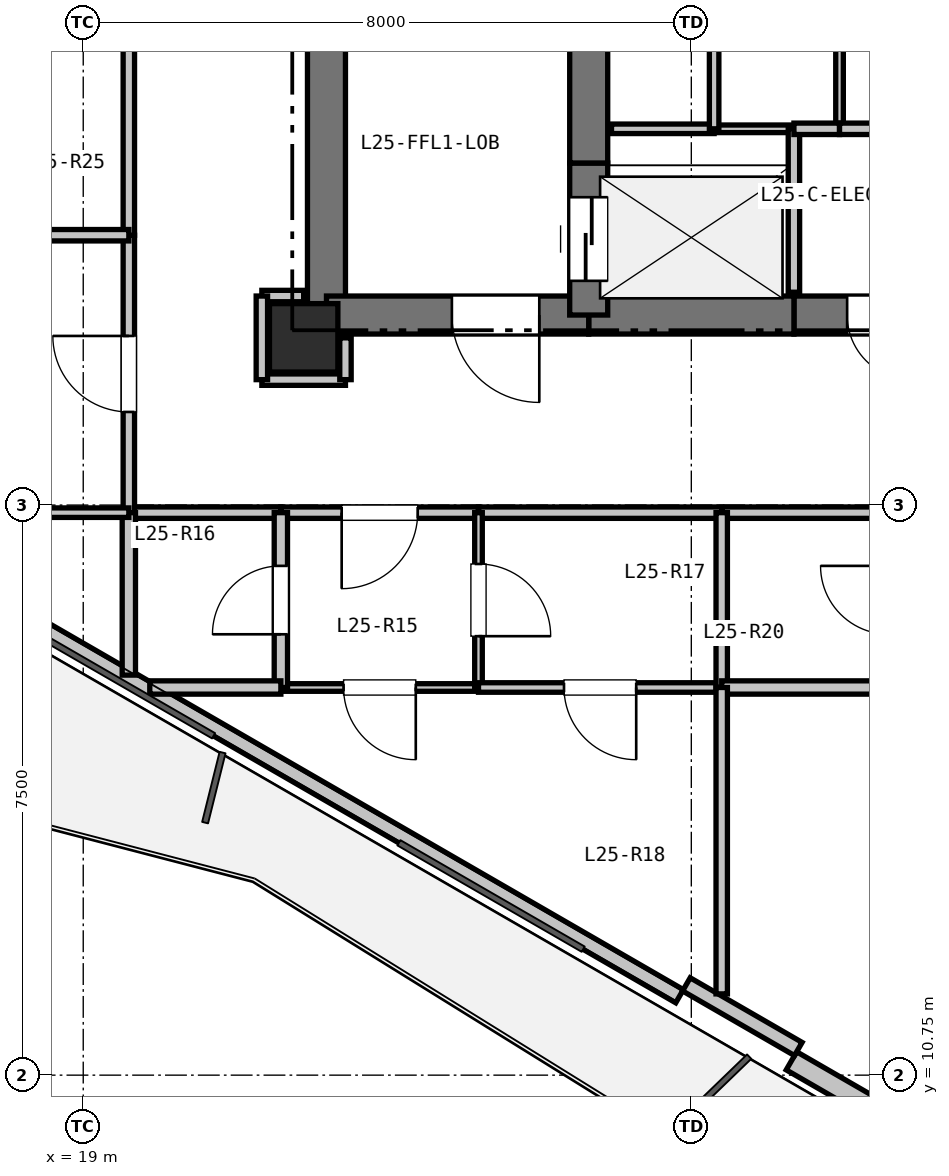
"""IFC4 building model, lengths in metres.
Left out: names, types, materials, properties, quantities, classifications, styles, units other than length and angle.
Written with IfcOpenShell. Run it as: python <this file> out.ifc"""

import sys

from ifc_helpers import new_model, si_unit, direction, frame, frame_2d, origin, origin_2d, place, context, subcontext, project, spatial, rectangle, extrude, element, fill, save


model = new_model("IFC4")
c1 = context("Model", 3, precision=1e-05, world=origin(), true_north=direction((0.0, 1.0)))
c2 = subcontext(c1, "Body", "Model", "MODEL_VIEW")
j1 = project(units=[si_unit("LENGTHUNIT", "METRE"), si_unit("PLANEANGLEUNIT", "RADIAN")], contexts=[c1])
p1 = place(None, origin())
s1 = spatial("IfcSite", under=j1, at=p1, CompositionType="ELEMENT")
p2 = place(p1, origin())
s2 = spatial("IfcBuilding", under=s1, at=p2, CompositionType="ELEMENT")
p3 = place(p2, frame((0.0, 0.0, 93.3)))
s3 = spatial("IfcBuildingStorey", under=s2, at=p3, CompositionType="ELEMENT", Elevation=93.3)
p4 = place(p3, frame((21.9, 20.45, 0.0), z_axis=(0.0, 0.0, 1.0), x_axis=(1.0, 0.0, 0.0)))
e1 = element("IfcColumn", 1, at=p4, inside=s3, PredefinedType="COLUMN", context=c2, shape_type="SweptSolid", body=[
    extrude(rectangle(XDim=0.9, YDim=0.9, at=origin_2d()), origin(), (0.0, 0.0, 1.0), 3.3),
])
p5 = place(p3, frame((38.649, 4.973, 0.0), z_axis=(0.0, 0.0, 1.0), x_axis=(-0.866023023012, 0.500004123596, 0.0)))
e2 = element("IfcWall", 2, at=p5, inside=s3, PredefinedType="SOLIDWALL", context=c2, shape_type="SweptSolid", body=[
    extrude(rectangle(XDim=11.93, YDim=0.275, at=frame_2d((5.965, 0.0))), origin(), (0.0, 0.0, 1.0), 2.67),
])
p6 = place(p5, frame((7.616, 0.0, 0.0)))
e3 = element("IfcOpeningElement", 3, at=p6, cuts=e2, PredefinedType="OPENING", context=c2, shape_type="SweptSolid", body=[
    extrude(rectangle(XDim=1.1, YDim=2.1, at=frame_2d((0.55, 1.05))), frame((0.0, 0.147, 0.0), z_axis=(0.0, -1.0, 0.0), x_axis=(1.0, 0.0, 0.0)), (0.0, 0.0, 1.0), 0.295),
])
p7 = place(p3, frame((26.845, 11.788, 0.0), z_axis=(0.0, 0.0, 1.0), x_axis=(-0.866027010039, 0.499997217876, 0.0)))
e4 = element("IfcWall", 4, at=p7, inside=s3, PredefinedType="PARAPET", context=c2, shape_type="SweptSolid", body=[
    extrude(rectangle(XDim=11.229, YDim=0.2, at=frame_2d((5.615, 0.0))), origin(), (0.0, 0.0, 1.0), 0.2),
])
p8 = place(p3, frame((28.407, 11.094, 0.0), z_axis=(0.0, 0.0, 1.0), x_axis=(-0.86605165483, 0.499954529098, 0.0)))
e5 = element("IfcWall", 5, at=p8, inside=s3, PredefinedType="PARAPET", context=c2, shape_type="SweptSolid", body=[
    extrude(rectangle(XDim=1.7, YDim=0.2, at=frame_2d((0.85, 0.0))), origin(), (0.0, 0.0, 1.0), 2.67),
])
p9 = place(p3, frame((22.2, 20.75, 0.0), z_axis=(0.0, 0.0, 1.0), x_axis=(0.0, 1.0, 0.0)))
e6 = element("IfcWall", 6, at=p9, inside=s3, PredefinedType="SHEAR", context=c2, shape_type="SweptSolid", body=[
    extrude(rectangle(XDim=4.65, YDim=0.5, at=frame_2d((2.325, 0.0))), origin(), (0.0, 0.0, 1.0), 3.05),
])
p10 = place(p3, frame((30.6, 20.75, 0.0), z_axis=(0.0, 0.0, 1.0), x_axis=(-1.0, 0.0, 0.0)))
e7 = element("IfcWall", 7, at=p10, inside=s3, PredefinedType="SHEAR", context=c2, shape_type="SweptSolid", body=[
    extrude(rectangle(XDim=2.25, YDim=0.5, at=frame_2d((1.125, 0.0))), origin(), (0.0, 0.0, 1.0), 3.05),
])
p11 = place(p10, frame((0.7, 0.0, 0.0)))
e8 = element("IfcOpeningElement", 8, at=p11, cuts=e7, PredefinedType="OPENING", context=c2, shape_type="SweptSolid", body=[
    extrude(rectangle(XDim=0.85, YDim=2.1, at=frame_2d((0.425, 1.05))), frame((0.0, 0.26, 0.0), z_axis=(0.0, -1.0, 0.0), x_axis=(1.0, 0.0, 0.0)), (0.0, 0.0, 1.0), 0.52),
])
p12 = place(p3, frame((28.35, 20.75, 0.0), z_axis=(0.0, 0.0, 1.0), x_axis=(-1.0, 0.0, 0.0)))
e9 = element("IfcWall", 9, at=p12, inside=s3, PredefinedType="SHEAR", context=c2, shape_type="SweptSolid", body=[
    extrude(rectangle(XDim=2.7, YDim=0.5, at=frame_2d((1.35, 0.0))), origin(), (0.0, 0.0, 1.0), 3.05),
])
p13 = place(p3, frame((25.65, 20.75, 0.0), z_axis=(0.0, 0.0, 1.0), x_axis=(-1.0, 0.0, 0.0)))
e10 = element("IfcWall", 10, at=p13, inside=s3, PredefinedType="SHEAR", context=c2, shape_type="SweptSolid", body=[
    extrude(rectangle(XDim=3.45, YDim=0.5, at=frame_2d((1.725, 0.0))), origin(), (0.0, 0.0, 1.0), 3.05),
])
p14 = place(p13, frame((0.65, 0.0, 0.0)))
e11 = element("IfcOpeningElement", 11, at=p14, cuts=e10, PredefinedType="OPENING", context=c2, shape_type="SweptSolid", body=[
    extrude(rectangle(XDim=1.15, YDim=2.15, at=frame_2d((0.575, 1.075))), frame((0.0, 0.26, 0.0), z_axis=(0.0, -1.0, 0.0), x_axis=(1.0, 0.0, 0.0)), (0.0, 0.0, 1.0), 0.52),
])
p15 = place(p3, frame((25.65, 20.75, 0.0), z_axis=(0.0, 0.0, 1.0), x_axis=(0.0, 1.0, 0.0)))
e12 = element("IfcWall", 12, at=p15, inside=s3, PredefinedType="SHEAR", context=c2, shape_type="SweptSolid", body=[
    extrude(rectangle(XDim=2.0, YDim=0.5, at=frame_2d((1.0, 0.0))), origin(), (0.0, 0.0, 1.0), 3.05),
])
p16 = place(p15, frame((0.45, 0.0, 0.0)))
e13 = element("IfcOpeningElement", 13, at=p16, cuts=e12, PredefinedType="OPENING", context=c2, shape_type="SweptSolid", body=[
    extrude(rectangle(XDim=1.1, YDim=2.15, at=frame_2d((0.55, 1.075))), frame((0.0, 0.26, 0.0), z_axis=(0.0, -1.0, 0.0), x_axis=(1.0, 0.0, 0.0)), (0.0, 0.0, 1.0), 0.52),
])
p17 = place(p3, frame((25.65, 22.75, 0.0), z_axis=(0.0, 0.0, 1.0), x_axis=(0.0, 1.0, 0.0)))
e14 = element("IfcWall", 14, at=p17, inside=s3, PredefinedType="SHEAR", context=c2, shape_type="SweptSolid", body=[
    extrude(rectangle(XDim=2.8, YDim=0.5, at=frame_2d((1.4, 0.0))), origin(), (0.0, 0.0, 1.0), 3.05),
])
p18 = place(p3, frame((25.95, 23.2, 0.0), z_axis=(0.0, 0.0, 1.0), x_axis=(1.0, 0.0, 0.0)))
e15 = element("IfcWall", 15, at=p18, inside=s3, PredefinedType="PARTITIONING", context=c2, shape_type="SweptSolid", body=[
    extrude(rectangle(XDim=1.35, YDim=0.125, at=frame_2d((0.675, 0.0))), origin(), (0.0, 0.0, 1.0), 3.05),
])
p19 = place(p3, frame((27.3, 23.2, 0.0), z_axis=(0.0, 0.0, 1.0), x_axis=(1.0, 0.0, 0.0)))
e16 = element("IfcWall", 16, at=p19, inside=s3, PredefinedType="PARTITIONING", context=c2, shape_type="SweptSolid", body=[
    extrude(rectangle(XDim=1.05, YDim=0.1, at=frame_2d((0.525, 0.0))), origin(), (0.0, 0.0, 1.0), 3.05),
])
p20 = place(p3, frame((28.35, 23.2, 0.0), z_axis=(0.0, 0.0, 1.0), x_axis=(0.0, -1.0, 0.0)))
e17 = element("IfcWall", 17, at=p20, inside=s3, PredefinedType="PARTITIONING", context=c2, shape_type="SweptSolid", body=[
    extrude(rectangle(XDim=2.15, YDim=0.15, at=frame_2d((1.075, 0.0))), origin(), (0.0, 0.0, 1.0), 3.05),
])
p21 = place(p3, frame((27.3, 25.4, 0.0), z_axis=(0.0, 0.0, 1.0), x_axis=(0.0, -1.0, 0.0)))
e18 = element("IfcWall", 18, at=p21, inside=s3, PredefinedType="PARTITIONING", context=c2, shape_type="SweptSolid", body=[
    extrude(rectangle(XDim=2.2, YDim=0.125, at=frame_2d((1.1, 0.0))), origin(), (0.0, 0.0, 1.0), 3.05),
])
p22 = place(p3, frame((28.95, 25.4, 0.0), z_axis=(0.0, 0.0, 1.0), x_axis=(0.0, -1.0, 0.0)))
e19 = element("IfcWall", 19, at=p22, inside=s3, PredefinedType="PARTITIONING", context=c2, shape_type="SweptSolid", body=[
    extrude(rectangle(XDim=2.2, YDim=0.1, at=frame_2d((1.1, 0.0))), origin(), (0.0, 0.0, 1.0), 3.05),
])
p23 = place(p3, frame((28.95, 23.2, 0.0), z_axis=(0.0, 0.0, 1.0), x_axis=(-1.0, 0.0, 0.0)))
e20 = element("IfcWall", 20, at=p23, inside=s3, PredefinedType="PARTITIONING", context=c2, shape_type="SweptSolid", body=[
    extrude(rectangle(XDim=0.6, YDim=0.15, at=frame_2d((0.3, 0.0))), origin(), (0.0, 0.0, 1.0), 3.05),
])
p24 = place(p3, frame((30.6, 23.2, 0.0), z_axis=(0.0, 0.0, 1.0), x_axis=(-1.0, 0.0, 0.0)))
e21 = element("IfcWall", 21, at=p24, inside=s3, PredefinedType="PARTITIONING", context=c2, shape_type="SweptSolid", body=[
    extrude(rectangle(XDim=1.65, YDim=0.15, at=frame_2d((0.825, 0.0))), origin(), (0.0, 0.0, 1.0), 3.05),
])
p25 = place(p3, frame((21.35, 19.9, 0.0), z_axis=(0.0, 0.0, 1.0), x_axis=(1.0, 0.0, 0.0)))
e22 = element("IfcWall", 22, at=p25, inside=s3, PredefinedType="PARTITIONING", context=c2, shape_type="SweptSolid", body=[
    extrude(rectangle(XDim=1.1, YDim=0.15, at=frame_2d((0.55, 0.0))), origin(), (0.0, 0.0, 1.0), 2.423),
])
p26 = place(p3, frame((22.45, 19.9, 0.0), z_axis=(0.0, 0.0, 1.0), x_axis=(0.0, 1.0, 0.0)))
e23 = element("IfcWall", 23, at=p26, inside=s3, PredefinedType="PARTITIONING", context=c2, shape_type="SweptSolid", body=[
    extrude(rectangle(XDim=0.55, YDim=0.15, at=frame_2d((0.275, 0.0))), origin(), (0.0, 0.0, 1.0), 2.423),
])
p27 = place(p3, frame((29.6, 18.15, 0.0), z_axis=(0.0, 0.0, 1.0), x_axis=(-1.0, 0.0, 0.0)))
e24 = element("IfcWall", 24, at=p27, inside=s3, PredefinedType="PARTITIONING", context=c2, shape_type="SweptSolid", body=[
    extrude(rectangle(XDim=2.2, YDim=0.15, at=frame_2d((1.1, 0.0))), origin(), (0.0, 0.0, 1.0), 3.05),
])
p28 = place(p3, frame((27.4, 18.15, 0.0), z_axis=(0.0, 0.0, 1.0), x_axis=(-1.0, 0.0, 0.0)))
e25 = element("IfcWall", 25, at=p28, inside=s3, PredefinedType="PARTITIONING", context=c2, shape_type="SweptSolid", body=[
    extrude(rectangle(XDim=3.2, YDim=0.15, at=frame_2d((1.6, 0.0))), origin(), (0.0, 0.0, 1.0), 2.423),
])
p29 = place(p3, frame((24.2, 18.15, 0.0), z_axis=(0.0, 0.0, 1.0), x_axis=(-1.0, 0.0, 0.0)))
e26 = element("IfcWall", 26, at=p29, inside=s3, PredefinedType="PARTITIONING", context=c2, shape_type="SweptSolid", body=[
    extrude(rectangle(XDim=2.6, YDim=0.15, at=frame_2d((1.3, 0.0))), origin(), (0.0, 0.0, 1.0), 2.423),
])
p30 = place(p29, frame((0.8, 0.0, 0.0)))
e27 = element("IfcOpeningElement", 27, at=p30, cuts=e26, PredefinedType="OPENING", context=c2, shape_type="SweptSolid", body=[
    extrude(rectangle(XDim=1.0, YDim=2.15, at=frame_2d((0.5, 1.075))), frame((0.0, 0.085, 0.0), z_axis=(0.0, -1.0, 0.0), x_axis=(1.0, 0.0, 0.0)), (0.0, 0.0, 1.0), 0.17),
])
p31 = place(p3, frame((21.6, 18.15, 0.0), z_axis=(0.0, 0.0, 1.0), x_axis=(-1.0, 0.0, 0.0)))
e28 = element("IfcWall", 28, at=p31, inside=s3, PredefinedType="PARTITIONING", context=c2, shape_type="SweptSolid", body=[
    extrude(rectangle(XDim=2.0, YDim=0.15, at=frame_2d((1.0, 0.0))), origin(), (0.0, 0.0, 1.0), 3.05),
])
p32 = place(p3, frame((19.6, 18.15, 0.0), z_axis=(0.0, 0.0, 1.0), x_axis=(0.0, 1.0, 0.0)))
e29 = element("IfcWall", 29, at=p32, inside=s3, PredefinedType="PARTITIONING", context=c2, shape_type="SweptSolid", body=[
    extrude(rectangle(XDim=3.65, YDim=0.15, at=frame_2d((1.825, 0.0))), origin(), (0.0, 0.0, 1.0), 2.423),
])
p33 = place(p32, frame((1.325, 0.0, 0.0)))
e30 = element("IfcOpeningElement", 30, at=p33, cuts=e29, PredefinedType="OPENING", context=c2, shape_type="SweptSolid", body=[
    extrude(rectangle(XDim=1.0, YDim=2.15, at=frame_2d((0.5, 1.075))), frame((0.0, 0.085, 0.0), z_axis=(0.0, -1.0, 0.0), x_axis=(1.0, 0.0, 0.0)), (0.0, 0.0, 1.0), 0.17),
])
p34 = place(p3, frame((19.6, 21.8, 0.0), z_axis=(0.0, 0.0, 1.0), x_axis=(0.0, 1.0, 0.0)))
e31 = element("IfcWall", 31, at=p34, inside=s3, PredefinedType="PARTITIONING", context=c2, shape_type="SweptSolid", body=[
    extrude(rectangle(XDim=3.2, YDim=0.15, at=frame_2d((1.6, 0.0))), origin(), (0.0, 0.0, 1.0), 3.05),
])
p35 = place(p3, frame((21.9, 21.0, 0.0), z_axis=(0.0, 0.0, 1.0), x_axis=(-1.0, 0.0, 0.0)))
e32 = element("IfcWall", 32, at=p35, inside=s3, PredefinedType="PARTITIONING", context=c2, shape_type="SweptSolid", body=[
    extrude(rectangle(XDim=0.55, YDim=0.15, at=frame_2d((0.275, 0.0))), origin(), (0.0, 0.0, 1.0), 2.498),
])
p36 = place(p3, frame((21.35, 21.0, 0.0), z_axis=(0.0, 0.0, 1.0), x_axis=(0.0, -1.0, 0.0)))
e33 = element("IfcWall", 33, at=p36, inside=s3, PredefinedType="PARTITIONING", context=c2, shape_type="SweptSolid", body=[
    extrude(rectangle(XDim=1.1, YDim=0.15, at=frame_2d((0.55, 0.0))), origin(), (0.0, 0.0, 1.0), 2.423),
])
p37 = place(p3, frame((24.2, 15.85, 0.0), z_axis=(0.0, 0.0, 1.0), x_axis=(-1.0, 0.0, 0.0)))
e34 = element("IfcWall", 34, at=p37, inside=s3, PredefinedType="PARTITIONING", context=c2, shape_type="SweptSolid", body=[
    extrude(rectangle(XDim=2.6, YDim=0.1, at=frame_2d((1.3, 0.0))), origin(), (0.0, 0.0, 1.0), 3.05),
])
p38 = place(p37, frame((0.825, 0.0, 0.0)))
e35 = element("IfcOpeningElement", 35, at=p38, cuts=e34, PredefinedType="OPENING", context=c2, shape_type="SweptSolid", body=[
    extrude(rectangle(XDim=0.95, YDim=2.1, at=frame_2d((0.475, 1.05))), frame((0.0, 0.06, 0.0), z_axis=(0.0, -1.0, 0.0), x_axis=(1.0, 0.0, 0.0)), (0.0, 0.0, 1.0), 0.12),
])
p39 = place(p3, frame((21.6, 15.85, 0.0), z_axis=(0.0, 0.0, 1.0), x_axis=(0.0, 1.0, 0.0)))
e36 = element("IfcWall", 36, at=p39, inside=s3, PredefinedType="PLUMBINGWALL", context=c2, shape_type="SweptSolid", body=[
    extrude(rectangle(XDim=2.3, YDim=0.175, at=frame_2d((1.15, 0.0))), origin(), (0.0, 0.0, 1.0), 3.05),
])
p40 = place(p39, frame((0.7, 0.0, 0.0)))
e37 = element("IfcOpeningElement", 37, at=p40, cuts=e36, PredefinedType="OPENING", context=c2, shape_type="SweptSolid", body=[
    extrude(rectangle(XDim=0.9, YDim=2.1, at=frame_2d((0.45, 1.05))), frame((0.0, 0.097, 0.0), z_axis=(0.0, -1.0, 0.0), x_axis=(1.0, 0.0, 0.0)), (0.0, 0.0, 1.0), 0.195),
])
p41 = place(p3, frame((24.2, 18.15, 0.0), z_axis=(0.0, 0.0, 1.0), x_axis=(0.0, -1.0, 0.0)))
e38 = element("IfcWall", 38, at=p41, inside=s3, PredefinedType="PARTITIONING", context=c2, shape_type="SweptSolid", body=[
    extrude(rectangle(XDim=2.3, YDim=0.1, at=frame_2d((1.15, 0.0))), origin(), (0.0, 0.0, 1.0), 2.423),
])
p42 = place(p41, frame((0.675, 0.0, 0.0)))
e39 = element("IfcOpeningElement", 39, at=p42, cuts=e38, PredefinedType="OPENING", context=c2, shape_type="SweptSolid", body=[
    extrude(rectangle(XDim=0.95, YDim=2.1, at=frame_2d((0.475, 1.05))), frame((0.0, 0.06, 0.0), z_axis=(0.0, -1.0, 0.0), x_axis=(1.0, 0.0, 0.0)), (0.0, 0.0, 1.0), 0.12),
])
p43 = place(p3, frame((21.6, 15.85, 0.0), z_axis=(0.0, 0.0, 1.0), x_axis=(-1.0, 0.0, 0.0)))
e40 = element("IfcWall", 40, at=p43, inside=s3, PredefinedType="PLUMBINGWALL", context=c2, shape_type="SweptSolid", body=[
    extrude(rectangle(XDim=1.725, YDim=0.175, at=frame_2d((0.862, 0.0))), origin(), (0.0, 0.0, 1.0), 2.365),
])
p44 = place(p3, frame((19.6, 16.013, 0.0), z_axis=(0.0, 0.0, 1.0), x_axis=(0.0, 1.0, 0.0)))
e41 = element("IfcWall", 41, at=p44, inside=s3, PredefinedType="PLUMBINGWALL", context=c2, shape_type="SweptSolid", body=[
    extrude(rectangle(XDim=2.137, YDim=0.175, at=frame_2d((1.068, 0.0))), origin(), (0.0, 0.0, 1.0), 2.365),
])
p45 = place(p3, frame((27.4, 15.85, 0.0), z_axis=(0.0, 0.0, 1.0), x_axis=(-1.0, 0.0, 0.0)))
e42 = element("IfcWall", 42, at=p45, inside=s3, PredefinedType="PARTITIONING", context=c2, shape_type="SweptSolid", body=[
    extrude(rectangle(XDim=3.2, YDim=0.125, at=frame_2d((1.6, 0.0))), origin(), (0.0, 0.0, 1.0), 2.423),
])
p46 = place(p45, frame((1.125, 0.0, 0.0)))
e43 = element("IfcOpeningElement", 43, at=p46, cuts=e42, PredefinedType="OPENING", context=c2, shape_type="SweptSolid", body=[
    extrude(rectangle(XDim=0.95, YDim=2.1, at=frame_2d((0.475, 1.05))), frame((0.0, 0.073, 0.0), z_axis=(0.0, -1.0, 0.0), x_axis=(1.0, 0.0, 0.0)), (0.0, 0.0, 1.0), 0.145),
])
p47 = place(p3, frame((27.4, 18.15, 0.0), z_axis=(0.0, 0.0, 1.0), x_axis=(0.0, -1.0, 0.0)))
e44 = element("IfcWall", 44, at=p47, inside=s3, PredefinedType="PARTITIONING", context=c2, shape_type="SweptSolid", body=[
    extrude(rectangle(XDim=2.3, YDim=0.15, at=frame_2d((1.15, 0.0))), origin(), (0.0, 0.0, 1.0), 3.05),
])
p48 = place(p3, frame((29.6, 15.85, 0.0), z_axis=(0.0, 0.0, 1.0), x_axis=(-1.0, 0.0, 0.0)))
e45 = element("IfcWall", 45, at=p48, inside=s3, PredefinedType="PLUMBINGWALL", context=c2, shape_type="SweptSolid", body=[
    extrude(rectangle(XDim=2.2, YDim=0.175, at=frame_2d((1.1, 0.0))), origin(), (0.0, 0.0, 1.0), 3.05),
])
p49 = place(p3, frame((19.6, 21.8, 0.0), z_axis=(0.0, 0.0, 1.0), x_axis=(-1.0, 0.0, 0.0)))
e46 = element("IfcWall", 46, at=p49, inside=s3, PredefinedType="PARTITIONING", context=c2, shape_type="SweptSolid", body=[
    extrude(rectangle(XDim=2.6, YDim=0.15, at=frame_2d((1.3, 0.0))), origin(), (0.0, 0.0, 1.0), 2.423),
])
p50 = place(p3, frame((19.6, 18.15, 0.0), z_axis=(0.0, 0.0, 1.0), x_axis=(-1.0, 0.0, 0.0)))
e47 = element("IfcWall", 47, at=p50, inside=s3, PredefinedType="PARTITIONING", context=c2, shape_type="SweptSolid", body=[
    extrude(rectangle(XDim=2.6, YDim=0.125, at=frame_2d((1.3, 0.0))), origin(), (0.0, 0.0, 1.0), 2.365),
])
p51 = place(p3, frame((27.4, 15.85, 0.0), z_axis=(0.0, 0.0, 1.0), x_axis=(0.0, -1.0, 0.0)))
e48 = element("IfcWall", 48, at=p51, inside=s3, PredefinedType="PARTITIONING", context=c2, shape_type="SweptSolid", body=[
    extrude(rectangle(XDim=4.031, YDim=0.15, at=frame_2d((2.016, 0.0))), origin(), (0.0, 0.0, 1.0), 2.365),
])
p52 = place(p16, origin())
e49 = element("IfcDoor", 49, at=p52, inside=s3, OperationType="SLIDING_TO_LEFT", PredefinedType="DOOR", context=c2, shape_type="SweptSolid", body=[
    extrude(rectangle(XDim=1.1, YDim=2.15, at=frame_2d((0.55, 1.075))), frame((0.0, 0.025, 0.0), z_axis=(0.0, -1.0, 0.0), x_axis=(1.0, 0.0, 0.0)), (0.0, 0.0, 1.0), 0.05),
])
fill(e13, e49)
p53 = place(p14, origin())
e50 = element("IfcDoor", 50, at=p53, inside=s3, OperationType="SINGLE_SWING_LEFT", PredefinedType="DOOR", context=c2, shape_type="SweptSolid", body=[
    extrude(rectangle(XDim=1.15, YDim=2.15, at=frame_2d((0.575, 1.075))), frame((0.0, 0.025, 0.0), z_axis=(0.0, -1.0, 0.0), x_axis=(1.0, 0.0, 0.0)), (0.0, 0.0, 1.0), 0.05),
])
fill(e11, e50)
p54 = place(p30, origin())
e51 = element("IfcDoor", 51, at=p54, inside=s3, OperationType="SINGLE_SWING_RIGHT", PredefinedType="DOOR", context=c2, shape_type="SweptSolid", body=[
    extrude(rectangle(XDim=1.0, YDim=2.15, at=frame_2d((0.5, 1.075))), frame((0.0, 0.025, 0.0), z_axis=(0.0, -1.0, 0.0), x_axis=(1.0, 0.0, 0.0)), (0.0, 0.0, 1.0), 0.05),
])
fill(e27, e51)
p55 = place(p11, origin())
e52 = element("IfcDoor", 52, at=p55, inside=s3, OperationType="SINGLE_SWING_LEFT", PredefinedType="DOOR", context=c2, shape_type="SweptSolid", body=[
    extrude(rectangle(XDim=0.85, YDim=2.1, at=frame_2d((0.425, 1.05))), frame((0.0, 0.025, 0.0), z_axis=(0.0, -1.0, 0.0), x_axis=(1.0, 0.0, 0.0)), (0.0, 0.0, 1.0), 0.05),
])
fill(e8, e52)
p56 = place(p33, origin())
e53 = element("IfcDoor", 53, at=p56, inside=s3, OperationType="SINGLE_SWING_RIGHT", PredefinedType="DOOR", context=c2, shape_type="SweptSolid", body=[
    extrude(rectangle(XDim=1.0, YDim=2.15, at=frame_2d((0.5, 1.075))), frame((0.0, 0.025, 0.0), z_axis=(0.0, -1.0, 0.0), x_axis=(1.0, 0.0, 0.0)), (0.0, 0.0, 1.0), 0.05),
])
fill(e30, e53)
p57 = place(p40, origin())
e54 = element("IfcDoor", 54, at=p57, inside=s3, OperationType="SINGLE_SWING_LEFT", PredefinedType="DOOR", context=c2, shape_type="SweptSolid", body=[
    extrude(rectangle(XDim=0.9, YDim=2.1, at=frame_2d((0.45, 1.05))), frame((0.0, 0.025, 0.0), z_axis=(0.0, -1.0, 0.0), x_axis=(1.0, 0.0, 0.0)), (0.0, 0.0, 1.0), 0.05),
])
fill(e37, e54)
p58 = place(p42, origin())
e55 = element("IfcDoor", 55, at=p58, inside=s3, OperationType="SINGLE_SWING_RIGHT", PredefinedType="DOOR", context=c2, shape_type="SweptSolid", body=[
    extrude(rectangle(XDim=0.95, YDim=2.1, at=frame_2d((0.475, 1.05))), frame((0.0, 0.025, 0.0), z_axis=(0.0, -1.0, 0.0), x_axis=(1.0, 0.0, 0.0)), (0.0, 0.0, 1.0), 0.05),
])
fill(e39, e55)
p59 = place(p38, origin())
e56 = element("IfcDoor", 56, at=p59, inside=s3, OperationType="SINGLE_SWING_LEFT", PredefinedType="DOOR", context=c2, shape_type="SweptSolid", body=[
    extrude(rectangle(XDim=0.95, YDim=2.1, at=frame_2d((0.475, 1.05))), frame((0.0, 0.025, 0.0), z_axis=(0.0, -1.0, 0.0), x_axis=(1.0, 0.0, 0.0)), (0.0, 0.0, 1.0), 0.05),
])
fill(e35, e56)
p60 = place(p46, origin())
e57 = element("IfcDoor", 57, at=p60, inside=s3, OperationType="SINGLE_SWING_LEFT", PredefinedType="DOOR", context=c2, shape_type="SweptSolid", body=[
    extrude(rectangle(XDim=0.95, YDim=2.1, at=frame_2d((0.475, 1.05))), frame((0.0, 0.025, 0.0), z_axis=(0.0, -1.0, 0.0), x_axis=(1.0, 0.0, 0.0)), (0.0, 0.0, 1.0), 0.05),
])
fill(e43, e57)
save(model, sys.argv[1])
